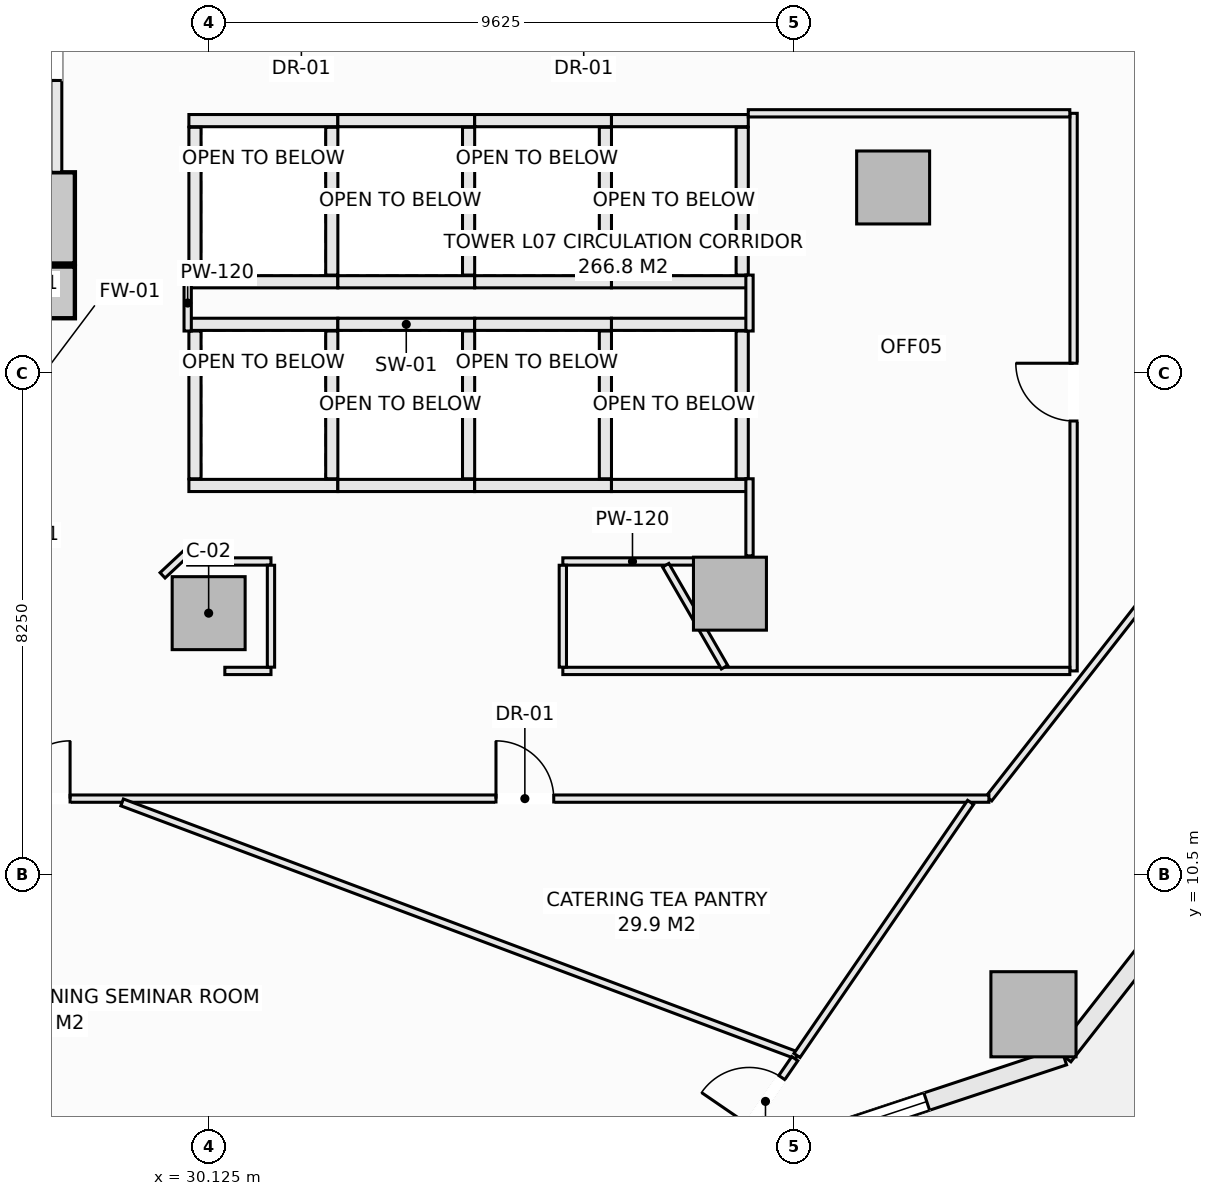
"""IFC4 building model, lengths in metres.
Left out: names, types, materials, properties, quantities, classifications, styles, units other than length and angle.
Written with IfcOpenShell. Run it as: python <this file> out.ifc"""

import sys

from ifc_helpers import new_model, si_unit, direction, frame, frame_2d, origin, origin_2d, place, context, subcontext, project, spatial, rectangle, extrude, element, fill, save


model = new_model("IFC4")
c1 = context("Model", 3, precision=1e-05, world=origin(), true_north=direction((0.0, 1.0)))
c2 = subcontext(c1, "Body", "Model", "MODEL_VIEW")
j1 = project(units=[si_unit("LENGTHUNIT", "METRE"), si_unit("PLANEANGLEUNIT", "RADIAN")], contexts=[c1])
p1 = place(None, origin())
s1 = spatial("IfcSite", under=j1, at=p1, CompositionType="ELEMENT")
p2 = place(p1, origin())
s2 = spatial("IfcBuilding", under=s1, at=p2, CompositionType="ELEMENT")
p3 = place(p2, frame((0.0, 0.0, 34.2)))
s3 = spatial("IfcBuildingStorey", under=s2, at=p3, CompositionType="ELEMENT", Elevation=34.2)
p4 = place(p3, frame((14.075, 20.075, -0.28), z_axis=(0.0, 0.0, 1.0), x_axis=(1.0, 0.0, 0.0)))
e1 = element("IfcWall", 1, at=p4, inside=s3, PredefinedType="SHEAR", context=c2, shape_type="SweptSolid", body=[
    extrude(rectangle(XDim=13.85, YDim=0.85, at=frame_2d((6.925, 0.0))), origin(), (0.0, 0.0, 1.0), 3.85),
])
p5 = place(p3, frame((27.5, 20.55, -0.28), z_axis=(0.0, 0.0, 1.0), x_axis=(0.0, 1.0, 0.0)))
e2 = element("IfcWall", 2, at=p5, inside=s3, PredefinedType="SHEAR", context=c2, shape_type="SweptSolid", body=[
    extrude(rectangle(XDim=1.5, YDim=0.85, at=frame_2d((0.75, 0.0))), origin(), (0.0, 0.0, 1.0), 3.85),
])
p6 = place(p3, frame((43.69, 8.204, -0.28), z_axis=(0.0, 0.0, 1.0), x_axis=(1.0, 0.0, 0.0)))
e3 = element("IfcColumn", 3, at=p6, inside=s3, PredefinedType="COLUMN", context=c2, shape_type="SweptSolid", body=[
    extrude(rectangle(XDim=1.4, YDim=1.4, at=origin_2d()), origin(), (0.0, 0.0, 1.0), 3.85),
])
for number, where, z_axis, x_axis in (
    (4, (30.125, 14.8, -0.28), (0.0, 0.0, 1.0), (1.0, 0.0, 0.0)),
    (5, (38.698, 15.121, -0.28), (0.0, 0.0, 1.0), (1.0, 0.0, 0.0)),
    (6, (41.382, 21.801, -0.28), (0.0, 0.0, 1.0), (1.0, 0.0, 0.0)),
):
    element("IfcColumn", number, at=place(p3, frame(where, z_axis=z_axis, x_axis=x_axis)), inside=s3, PredefinedType="COLUMN", context=c2, shape_type="SweptSolid", body=[
        extrude(rectangle(XDim=1.2, YDim=1.2, at=origin_2d()), origin(), (0.0, 0.0, 1.0), 3.85),
    ])
p7 = place(p3, frame((37.404, 5.267, 0.0), z_axis=(0.0, 0.0, 1.0), x_axis=(0.949238715533, 0.31455661006, 0.0)))
e7 = element("IfcWall", 7, at=p7, inside=s3, PredefinedType="SOLIDWALL", context=c2, shape_type="SweptSolid", body=[
    extrude(rectangle(XDim=7.146, YDim=0.3, at=frame_2d((3.573, 0.0))), origin(), (0.0, 0.0, 1.0), 3.093),
])
p8 = place(p7, frame((2.373, 0.0, 0.85)))
e8 = element("IfcOpeningElement", 8, at=p8, cuts=e7, PredefinedType="OPENING", context=c2, shape_type="SweptSolid", body=[
    extrude(rectangle(XDim=2.4, YDim=1.9, at=frame_2d((1.2, 0.95))), frame((0.0, 0.16, 0.0), z_axis=(0.0, -1.0, 0.0), x_axis=(1.0, 0.0, 0.0)), (0.0, 0.0, 1.0), 0.32),
])
p9 = place(p3, frame((44.188, 7.514, 0.0), z_axis=(0.0, 0.0, 1.0), x_axis=(0.616421309777, 0.787416515482, 0.0)))
e9 = element("IfcWall", 9, at=p9, inside=s3, PredefinedType="SOLIDWALL", context=c2, shape_type="SweptSolid", body=[
    extrude(rectangle(XDim=6.696, YDim=0.3, at=frame_2d((3.348, 0.0))), origin(), (0.0, 0.0, 1.0), 3.093),
])
p10 = place(p9, frame((2.448, 0.0, 0.0)))
e10 = element("IfcOpeningElement", 10, at=p10, cuts=e9, PredefinedType="OPENING", context=c2, shape_type="SweptSolid", body=[
    extrude(rectangle(XDim=1.8, YDim=2.25, at=frame_2d((0.9, 1.125))), frame((0.0, 0.16, 0.0), z_axis=(0.0, -1.0, 0.0), x_axis=(1.0, 0.0, 0.0)), (0.0, 0.0, 1.0), 0.32),
])
for number, where, z_axis, x_axis in (
    (11, (29.8, 19.55, 0.0), (0.0, 0.0, 1.0), (1.0, 0.0, 0.0)),
    (12, (29.8, 16.9, 0.0), (0.0, 0.0, 1.0), (1.0, 0.0, 0.0)),
):
    element("IfcWall", number, at=place(p3, frame(where, z_axis=z_axis, x_axis=x_axis)), inside=s3, PredefinedType="SOLIDWALL", context=c2, shape_type="SweptSolid", body=[
        extrude(rectangle(XDim=2.45, YDim=0.2, at=frame_2d((1.225, 0.0))), origin(), (0.0, 0.0, 1.0), 3.57),
    ])
for number, where, z_axis, x_axis in (
    (13, (29.9, 17.01, 0.0), (0.0, 0.0, 1.0), (0.0, 1.0, 0.0)),
    (14, (32.15, 17.01, 0.0), (0.0, 0.0, 1.0), (0.0, 1.0, 0.0)),
):
    element("IfcWall", number, at=place(p3, frame(where, z_axis=z_axis, x_axis=x_axis)), inside=s3, PredefinedType="SOLIDWALL", context=c2, shape_type="SweptSolid", body=[
        extrude(rectangle(XDim=2.43, YDim=0.2, at=frame_2d((1.215, 0.0))), origin(), (0.0, 0.0, 1.0), 3.57),
    ])
for number, where, z_axis, x_axis in (
    (15, (32.25, 19.55, 0.0), (0.0, 0.0, 1.0), (1.0, 0.0, 0.0)),
    (16, (32.25, 16.9, 0.0), (0.0, 0.0, 1.0), (1.0, 0.0, 0.0)),
):
    element("IfcWall", number, at=place(p3, frame(where, z_axis=z_axis, x_axis=x_axis)), inside=s3, PredefinedType="SOLIDWALL", context=c2, shape_type="SweptSolid", body=[
        extrude(rectangle(XDim=2.25, YDim=0.2, at=frame_2d((1.125, 0.0))), origin(), (0.0, 0.0, 1.0), 3.57),
    ])
p11 = place(p3, frame((34.4, 17.01, 0.0), z_axis=(0.0, 0.0, 1.0), x_axis=(0.0, 1.0, 0.0)))
e17 = element("IfcWall", 17, at=p11, inside=s3, PredefinedType="SOLIDWALL", context=c2, shape_type="SweptSolid", body=[
    extrude(rectangle(XDim=2.43, YDim=0.2, at=frame_2d((1.215, 0.0))), origin(), (0.0, 0.0, 1.0), 3.57),
])
for number, where, z_axis, x_axis in (
    (18, (34.5, 19.55, 0.0), (0.0, 0.0, 1.0), (1.0, 0.0, 0.0)),
    (19, (34.5, 16.9, 0.0), (0.0, 0.0, 1.0), (1.0, 0.0, 0.0)),
):
    element("IfcWall", number, at=place(p3, frame(where, z_axis=z_axis, x_axis=x_axis)), inside=s3, PredefinedType="SOLIDWALL", context=c2, shape_type="SweptSolid", body=[
        extrude(rectangle(XDim=2.25, YDim=0.2, at=frame_2d((1.125, 0.0))), origin(), (0.0, 0.0, 1.0), 3.57),
    ])
p12 = place(p3, frame((36.65, 17.01, 0.0), z_axis=(0.0, 0.0, 1.0), x_axis=(0.0, 1.0, 0.0)))
e20 = element("IfcWall", 20, at=p12, inside=s3, PredefinedType="SOLIDWALL", context=c2, shape_type="SweptSolid", body=[
    extrude(rectangle(XDim=2.43, YDim=0.2, at=frame_2d((1.215, 0.0))), origin(), (0.0, 0.0, 1.0), 3.57),
])
for number, where, z_axis, x_axis in (
    (21, (36.75, 19.55, 0.0), (0.0, 0.0, 1.0), (1.0, 0.0, 0.0)),
    (22, (36.75, 16.9, 0.0), (0.0, 0.0, 1.0), (1.0, 0.0, 0.0)),
):
    element("IfcWall", number, at=place(p3, frame(where, z_axis=z_axis, x_axis=x_axis)), inside=s3, PredefinedType="SOLIDWALL", context=c2, shape_type="SweptSolid", body=[
        extrude(rectangle(XDim=2.25, YDim=0.2, at=frame_2d((1.125, 0.0))), origin(), (0.0, 0.0, 1.0), 3.57),
    ])
p13 = place(p3, frame((38.9, 17.01, 0.0), z_axis=(0.0, 0.0, 1.0), x_axis=(0.0, 1.0, 0.0)))
e23 = element("IfcWall", 23, at=p13, inside=s3, PredefinedType="SOLIDWALL", context=c2, shape_type="SweptSolid", body=[
    extrude(rectangle(XDim=2.43, YDim=0.2, at=frame_2d((1.215, 0.0))), origin(), (0.0, 0.0, 1.0), 3.57),
])
for number, where, z_axis, x_axis in (
    (24, (29.8, 22.9, 0.0), (0.0, 0.0, 1.0), (1.0, 0.0, 0.0)),
    (25, (29.8, 20.25, 0.0), (0.0, 0.0, 1.0), (1.0, 0.0, 0.0)),
):
    element("IfcWall", number, at=place(p3, frame(where, z_axis=z_axis, x_axis=x_axis)), inside=s3, PredefinedType="SOLIDWALL", context=c2, shape_type="SweptSolid", body=[
        extrude(rectangle(XDim=2.45, YDim=0.2, at=frame_2d((1.225, 0.0))), origin(), (0.0, 0.0, 1.0), 3.57),
    ])
for number, where, z_axis, x_axis in (
    (26, (29.9, 20.36, 0.0), (0.0, 0.0, 1.0), (0.0, 1.0, 0.0)),
    (27, (32.15, 20.36, 0.0), (0.0, 0.0, 1.0), (0.0, 1.0, 0.0)),
):
    element("IfcWall", number, at=place(p3, frame(where, z_axis=z_axis, x_axis=x_axis)), inside=s3, PredefinedType="SOLIDWALL", context=c2, shape_type="SweptSolid", body=[
        extrude(rectangle(XDim=2.43, YDim=0.2, at=frame_2d((1.215, 0.0))), origin(), (0.0, 0.0, 1.0), 3.57),
    ])
for number, where, z_axis, x_axis in (
    (28, (32.25, 22.9, 0.0), (0.0, 0.0, 1.0), (1.0, 0.0, 0.0)),
    (29, (32.25, 20.25, 0.0), (0.0, 0.0, 1.0), (1.0, 0.0, 0.0)),
):
    element("IfcWall", number, at=place(p3, frame(where, z_axis=z_axis, x_axis=x_axis)), inside=s3, PredefinedType="SOLIDWALL", context=c2, shape_type="SweptSolid", body=[
        extrude(rectangle(XDim=2.25, YDim=0.2, at=frame_2d((1.125, 0.0))), origin(), (0.0, 0.0, 1.0), 3.57),
    ])
p14 = place(p3, frame((34.4, 20.36, 0.0), z_axis=(0.0, 0.0, 1.0), x_axis=(0.0, 1.0, 0.0)))
e30 = element("IfcWall", 30, at=p14, inside=s3, PredefinedType="SOLIDWALL", context=c2, shape_type="SweptSolid", body=[
    extrude(rectangle(XDim=2.43, YDim=0.2, at=frame_2d((1.215, 0.0))), origin(), (0.0, 0.0, 1.0), 3.57),
])
for number, where, z_axis, x_axis in (
    (31, (34.5, 22.9, 0.0), (0.0, 0.0, 1.0), (1.0, 0.0, 0.0)),
    (32, (34.5, 20.25, 0.0), (0.0, 0.0, 1.0), (1.0, 0.0, 0.0)),
):
    element("IfcWall", number, at=place(p3, frame(where, z_axis=z_axis, x_axis=x_axis)), inside=s3, PredefinedType="SOLIDWALL", context=c2, shape_type="SweptSolid", body=[
        extrude(rectangle(XDim=2.25, YDim=0.2, at=frame_2d((1.125, 0.0))), origin(), (0.0, 0.0, 1.0), 3.57),
    ])
p15 = place(p3, frame((36.65, 20.36, 0.0), z_axis=(0.0, 0.0, 1.0), x_axis=(0.0, 1.0, 0.0)))
e33 = element("IfcWall", 33, at=p15, inside=s3, PredefinedType="SOLIDWALL", context=c2, shape_type="SweptSolid", body=[
    extrude(rectangle(XDim=2.43, YDim=0.2, at=frame_2d((1.215, 0.0))), origin(), (0.0, 0.0, 1.0), 3.57),
])
for number, where, z_axis, x_axis in (
    (34, (36.75, 22.9, 0.0), (0.0, 0.0, 1.0), (1.0, 0.0, 0.0)),
    (35, (36.75, 20.25, 0.0), (0.0, 0.0, 1.0), (1.0, 0.0, 0.0)),
):
    element("IfcWall", number, at=place(p3, frame(where, z_axis=z_axis, x_axis=x_axis)), inside=s3, PredefinedType="SOLIDWALL", context=c2, shape_type="SweptSolid", body=[
        extrude(rectangle(XDim=2.25, YDim=0.2, at=frame_2d((1.125, 0.0))), origin(), (0.0, 0.0, 1.0), 3.57),
    ])
p16 = place(p3, frame((38.9, 20.36, 0.0), z_axis=(0.0, 0.0, 1.0), x_axis=(0.0, 1.0, 0.0)))
e36 = element("IfcWall", 36, at=p16, inside=s3, PredefinedType="SOLIDWALL", context=c2, shape_type="SweptSolid", body=[
    extrude(rectangle(XDim=2.43, YDim=0.2, at=frame_2d((1.215, 0.0))), origin(), (0.0, 0.0, 1.0), 3.57),
])
p17 = place(p3, frame((27.62, 22.05, 0.0), z_axis=(0.0, 0.0, 1.0), x_axis=(0.0, 1.0, 0.0)))
e37 = element("IfcWall", 37, at=p17, inside=s3, PredefinedType="SOLIDWALL", context=c2, shape_type="SweptSolid", body=[
    extrude(rectangle(XDim=9.9, YDim=0.18, at=frame_2d((4.95, 0.0))), origin(), (0.0, 0.0, 1.0), 2.662),
])
p18 = place(p17, frame((4.475, 0.0, 0.0)))
e38 = element("IfcOpeningElement", 38, at=p18, cuts=e37, PredefinedType="OPENING", context=c2, shape_type="SweptSolid", body=[
    extrude(rectangle(XDim=0.95, YDim=2.1, at=frame_2d((0.475, 1.05))), frame((0.0, 0.1, 0.0), z_axis=(0.0, -1.0, 0.0), x_axis=(1.0, 0.0, 0.0)), (0.0, 0.0, 1.0), 0.2),
])
p19 = place(p17, frame((6.89, 0.0, 0.0)))
e39 = element("IfcOpeningElement", 39, at=p19, cuts=e37, PredefinedType="OPENING", context=c2, shape_type="SweptSolid", body=[
    extrude(rectangle(XDim=1.5, YDim=2.2, at=frame_2d((0.75, 1.1))), frame((0.0, 0.1, 0.0), z_axis=(0.0, -1.0, 0.0), x_axis=(1.0, 0.0, 0.0)), (0.0, 0.0, 1.0), 0.2),
])
p20 = place(p17, frame((1.51, 0.0, 0.0)))
e40 = element("IfcOpeningElement", 40, at=p20, cuts=e37, PredefinedType="OPENING", context=c2, shape_type="SweptSolid", body=[
    extrude(rectangle(XDim=1.5, YDim=2.2, at=frame_2d((0.75, 1.1))), frame((0.0, 0.1, 0.0), z_axis=(0.0, -1.0, 0.0), x_axis=(1.0, 0.0, 0.0)), (0.0, 0.0, 1.0), 0.2),
])
p21 = place(p3, frame((29.78, 19.44, 0.0), z_axis=(0.0, 0.0, 1.0), x_axis=(0.0, 1.0, 0.0)))
e41 = element("IfcWall", 41, at=p21, inside=s3, PredefinedType="PARTITIONING", context=c2, shape_type="SweptSolid", body=[
    extrude(rectangle(XDim=0.92, YDim=0.12, at=frame_2d((0.46, 0.0))), origin(), (0.0, 0.0, 1.0), 3.57),
])
p22 = place(p3, frame((44.35, 13.85, 0.0), z_axis=(0.0, 0.0, 1.0), x_axis=(0.0, 1.0, 0.0)))
e42 = element("IfcWall", 42, at=p22, inside=s3, PredefinedType="PARTITIONING", context=c2, shape_type="SweptSolid", body=[
    extrude(rectangle(XDim=9.17, YDim=0.12, at=frame_2d((4.585, 0.0))), origin(), (0.0, 0.0, 1.0), 3.57),
])
p23 = place(p22, frame((4.11, 0.0, 0.0)))
e43 = element("IfcOpeningElement", 43, at=p23, cuts=e42, PredefinedType="OPENING", context=c2, shape_type="SweptSolid", body=[
    extrude(rectangle(XDim=0.95, YDim=2.1, at=frame_2d((0.475, 1.05))), frame((0.0, 0.07, 0.0), z_axis=(0.0, -1.0, 0.0), x_axis=(1.0, 0.0, 0.0)), (0.0, 0.0, 1.0), 0.14),
])
p24 = place(p3, frame((42.957, 11.75, 0.0), z_axis=(0.0, 0.0, 1.0), x_axis=(0.616428289415, 0.78741105149, 0.0)))
e44 = element("IfcWall", 44, at=p24, inside=s3, PredefinedType="PARTITIONING", context=c2, shape_type="SweptSolid", body=[
    extrude(rectangle(XDim=5.375, YDim=0.12, at=frame_2d((2.687, 0.0))), origin(), (0.0, 0.0, 1.0), 3.57),
])
p25 = place(p3, frame((23.462, 11.75, 0.0), z_axis=(0.0, 0.0, 1.0), x_axis=(1.0, 0.0, 0.0)))
e45 = element("IfcWall", 45, at=p25, inside=s3, PredefinedType="PARTITIONING", context=c2, shape_type="SweptSolid", body=[
    extrude(rectangle(XDim=19.495, YDim=0.12, at=frame_2d((9.748, 0.0))), origin(), (0.0, 0.0, 1.0), 3.57),
])
p26 = place(p25, frame((3.434, 0.0, 0.0)))
e46 = element("IfcOpeningElement", 46, at=p26, cuts=e45, PredefinedType="OPENING", context=c2, shape_type="SweptSolid", body=[
    extrude(rectangle(XDim=0.95, YDim=2.1, at=frame_2d((0.475, 1.05))), frame((0.0, 0.07, 0.0), z_axis=(0.0, -1.0, 0.0), x_axis=(1.0, 0.0, 0.0)), (0.0, 0.0, 1.0), 0.14),
])
p27 = place(p25, frame((11.388, 0.0, 0.0)))
e47 = element("IfcOpeningElement", 47, at=p27, cuts=e45, PredefinedType="OPENING", context=c2, shape_type="SweptSolid", body=[
    extrude(rectangle(XDim=0.95, YDim=2.1, at=frame_2d((0.475, 1.05))), frame((0.0, 0.07, 0.0), z_axis=(0.0, -1.0, 0.0), x_axis=(1.0, 0.0, 0.0)), (0.0, 0.0, 1.0), 0.14),
])
p28 = place(p3, frame((30.391, 13.85, 0.0), z_axis=(0.0, 0.0, 1.0), x_axis=(1.0, 0.0, 0.0)))
e48 = element("IfcWall", 48, at=p28, inside=s3, PredefinedType="PARTITIONING", context=c2, shape_type="SweptSolid", body=[
    extrude(rectangle(XDim=0.759, YDim=0.12, at=frame_2d((0.379, 0.0))), origin(), (0.0, 0.0, 1.0), 3.57),
])
p29 = place(p3, frame((35.95, 13.85, 0.0), z_axis=(0.0, 0.0, 1.0), x_axis=(1.0, 0.0, 0.0)))
e49 = element("IfcWall", 49, at=p29, inside=s3, PredefinedType="PARTITIONING", context=c2, shape_type="SweptSolid", body=[
    extrude(rectangle(XDim=8.338, YDim=0.12, at=frame_2d((4.169, 0.0))), origin(), (0.0, 0.0, 1.0), 3.57),
])
p30 = place(p3, frame((29.78, 15.65, 0.0), z_axis=(0.0, 0.0, 1.0), x_axis=(1.0, 0.0, 0.0)))
e50 = element("IfcWall", 50, at=p30, inside=s3, PredefinedType="PARTITIONING", context=c2, shape_type="SweptSolid", body=[
    extrude(rectangle(XDim=1.37, YDim=0.12, at=frame_2d((0.685, 0.0))), origin(), (0.0, 0.0, 1.0), 3.57),
])
p31 = place(p3, frame((35.95, 15.65, 0.0), z_axis=(0.0, 0.0, 1.0), x_axis=(1.0, 0.0, 0.0)))
e51 = element("IfcWall", 51, at=p31, inside=s3, PredefinedType="PARTITIONING", context=c2, shape_type="SweptSolid", body=[
    extrude(rectangle(XDim=2.291, YDim=0.12, at=frame_2d((1.146, 0.0))), origin(), (0.0, 0.0, 1.0), 3.57),
])
p32 = place(p3, frame((35.95, 13.912, 0.0), z_axis=(0.0, 0.0, 1.0), x_axis=(0.0, 1.0, 0.0)))
e52 = element("IfcWall", 52, at=p32, inside=s3, PredefinedType="PARTITIONING", context=c2, shape_type="SweptSolid", body=[
    extrude(rectangle(XDim=1.676, YDim=0.12, at=frame_2d((0.838, 0.0))), origin(), (0.0, 0.0, 1.0), 3.57),
])
p33 = place(p3, frame((39.0, 23.02, 0.0), z_axis=(0.0, 0.0, 1.0), x_axis=(1.0, 0.0, 0.0)))
e53 = element("IfcWall", 53, at=p33, inside=s3, PredefinedType="PARTITIONING", context=c2, shape_type="SweptSolid", body=[
    extrude(rectangle(XDim=5.288, YDim=0.12, at=frame_2d((2.644, 0.0))), origin(), (0.0, 0.0, 1.0), 3.57),
])
p34 = place(p3, frame((39.02, 15.742, 0.0), z_axis=(0.0, 0.0, 1.0), x_axis=(0.0, 1.0, 0.0)))
e54 = element("IfcWall", 54, at=p34, inside=s3, PredefinedType="PARTITIONING", context=c2, shape_type="SweptSolid", body=[
    extrude(rectangle(XDim=1.268, YDim=0.12, at=frame_2d((0.634, 0.0))), origin(), (0.0, 0.0, 1.0), 2.934),
])
p35 = place(p3, frame((39.02, 19.44, 0.0), z_axis=(0.0, 0.0, 1.0), x_axis=(0.0, 1.0, 0.0)))
e55 = element("IfcWall", 55, at=p35, inside=s3, PredefinedType="PARTITIONING", context=c2, shape_type="SweptSolid", body=[
    extrude(rectangle(XDim=0.92, YDim=0.12, at=frame_2d((0.46, 0.0))), origin(), (0.0, 0.0, 1.0), 3.57),
])
p36 = place(p3, frame((29.367, 15.422, 0.0), z_axis=(0.0, 0.0, 1.0), x_axis=(0.730667420492, 0.682733564893, 0.0)))
e56 = element("IfcWall", 56, at=p36, inside=s3, PredefinedType="PARTITIONING", context=c2, shape_type="SweptSolid", body=[
    extrude(rectangle(XDim=0.565, YDim=0.12, at=frame_2d((0.283, 0.0))), origin(), (0.0, 0.0, 1.0), 3.57),
])
p37 = place(p3, frame((31.15, 13.912, 0.0), z_axis=(0.0, 0.0, 1.0), x_axis=(0.0, 1.0, 0.0)))
e57 = element("IfcWall", 57, at=p37, inside=s3, PredefinedType="PARTITIONING", context=c2, shape_type="SweptSolid", body=[
    extrude(rectangle(XDim=1.676, YDim=0.12, at=frame_2d((0.838, 0.0))), origin(), (0.0, 0.0, 1.0), 3.57),
])
p38 = place(p3, frame((28.702, 11.688, 0.0), z_axis=(0.0, 0.0, 1.0), x_axis=(0.936344412232, -0.351082813139, 0.0)))
e58 = element("IfcWall", 58, at=p38, inside=s3, PredefinedType="PARTITIONING", context=c2, shape_type="SweptSolid", body=[
    extrude(rectangle(XDim=11.854, YDim=0.12, at=frame_2d((5.927, 0.0))), origin(), (0.0, 0.0, 1.0), 3.093),
])
p39 = place(p3, frame((38.642, 5.837, 0.0), z_axis=(0.0, 0.0, 1.0), x_axis=(0.565776914944, 0.82455835604, 0.0)))
e59 = element("IfcWall", 59, at=p39, inside=s3, PredefinedType="PARTITIONING", context=c2, shape_type="SweptSolid", body=[
    extrude(rectangle(XDim=1.985, YDim=0.12, at=frame_2d((0.992, 0.0))), origin(), (0.0, 0.0, 1.0), 3.57),
])
p40 = place(p39, frame((0.657, 0.0, 0.0)))
e60 = element("IfcOpeningElement", 60, at=p40, cuts=e59, PredefinedType="OPENING", context=c2, shape_type="SweptSolid", body=[
    extrude(rectangle(XDim=0.95, YDim=2.1, at=frame_2d((0.475, 1.05))), frame((0.0, 0.07, 0.0), z_axis=(0.0, -1.0, 0.0), x_axis=(1.0, 0.0, 0.0)), (0.0, 0.0, 1.0), 0.14),
])
p41 = place(p3, frame((39.801, 7.526, 0.0), z_axis=(0.0, 0.0, 1.0), x_axis=(0.565756744253, 0.824572195949, 0.0)))
e61 = element("IfcWall", 61, at=p41, inside=s3, PredefinedType="PARTITIONING", context=c2, shape_type="SweptSolid", body=[
    extrude(rectangle(XDim=5.048, YDim=0.12, at=frame_2d((2.524, 0.0))), origin(), (0.0, 0.0, 1.0), 3.57),
])
p42 = place(p3, frame((37.642, 15.588, 0.0), z_axis=(0.0, 0.0, 1.0), x_axis=(0.499911776505, -0.866076333652, 0.0)))
e62 = element("IfcWall", 62, at=p42, inside=s3, PredefinedType="PARTITIONING", context=c2, shape_type="SweptSolid", body=[
    extrude(rectangle(XDim=1.935, YDim=0.12, at=frame_2d((0.967, 0.0))), origin(), (0.0, 0.0, 1.0), 3.57),
])
p43 = place(p8, origin())
e63 = element("IfcWindow", 63, at=p43, inside=s3, PartitioningType="SINGLE_PANEL", PredefinedType="WINDOW", context=c2, shape_type="SweptSolid", body=[
    extrude(rectangle(XDim=2.4, YDim=1.9, at=frame_2d((1.2, 0.95))), frame((0.0, 0.03, 0.0), z_axis=(0.0, -1.0, 0.0), x_axis=(1.0, 0.0, 0.0)), (0.0, 0.0, 1.0), 0.06),
])
fill(e8, e63)
p44 = place(p20, origin())
e64 = element("IfcDoor", 64, at=p44, inside=s3, OperationType="DOUBLE_DOOR_SINGLE_SWING", PredefinedType="DOOR", context=c2, shape_type="SweptSolid", body=[
    extrude(rectangle(XDim=1.5, YDim=2.2, at=frame_2d((0.75, 1.1))), frame((0.0, 0.025, 0.0), z_axis=(0.0, -1.0, 0.0), x_axis=(1.0, 0.0, 0.0)), (0.0, 0.0, 1.0), 0.05),
])
fill(e40, e64)
p45 = place(p26, origin())
e65 = element("IfcDoor", 65, at=p45, inside=s3, OperationType="SINGLE_SWING_RIGHT", PredefinedType="DOOR", context=c2, shape_type="SweptSolid", body=[
    extrude(rectangle(XDim=0.95, YDim=2.1, at=frame_2d((0.475, 1.05))), frame((0.0, 0.025, 0.0), z_axis=(0.0, -1.0, 0.0), x_axis=(1.0, 0.0, 0.0)), (0.0, 0.0, 1.0), 0.05),
])
fill(e46, e65)
p46 = place(p27, origin())
e66 = element("IfcDoor", 66, at=p46, inside=s3, OperationType="SINGLE_SWING_LEFT", PredefinedType="DOOR", context=c2, shape_type="SweptSolid", body=[
    extrude(rectangle(XDim=0.95, YDim=2.1, at=frame_2d((0.475, 1.05))), frame((0.0, 0.025, 0.0), z_axis=(0.0, -1.0, 0.0), x_axis=(1.0, 0.0, 0.0)), (0.0, 0.0, 1.0), 0.05),
])
fill(e47, e66)
p47 = place(p23, origin())
e67 = element("IfcDoor", 67, at=p47, inside=s3, OperationType="SINGLE_SWING_RIGHT", PredefinedType="DOOR", context=c2, shape_type="SweptSolid", body=[
    extrude(rectangle(XDim=0.95, YDim=2.1, at=frame_2d((0.475, 1.05))), frame((0.0, 0.025, 0.0), z_axis=(0.0, -1.0, 0.0), x_axis=(1.0, 0.0, 0.0)), (0.0, 0.0, 1.0), 0.05),
])
fill(e43, e67)
p48 = place(p40, origin())
e68 = element("IfcDoor", 68, at=p48, inside=s3, OperationType="SINGLE_SWING_LEFT", PredefinedType="DOOR", context=c2, shape_type="SweptSolid", body=[
    extrude(rectangle(XDim=0.95, YDim=2.1, at=frame_2d((0.475, 1.05))), frame((0.0, 0.025, 0.0), z_axis=(0.0, -1.0, 0.0), x_axis=(1.0, 0.0, 0.0)), (0.0, 0.0, 1.0), 0.05),
])
fill(e60, e68)
save(model, sys.argv[1])
